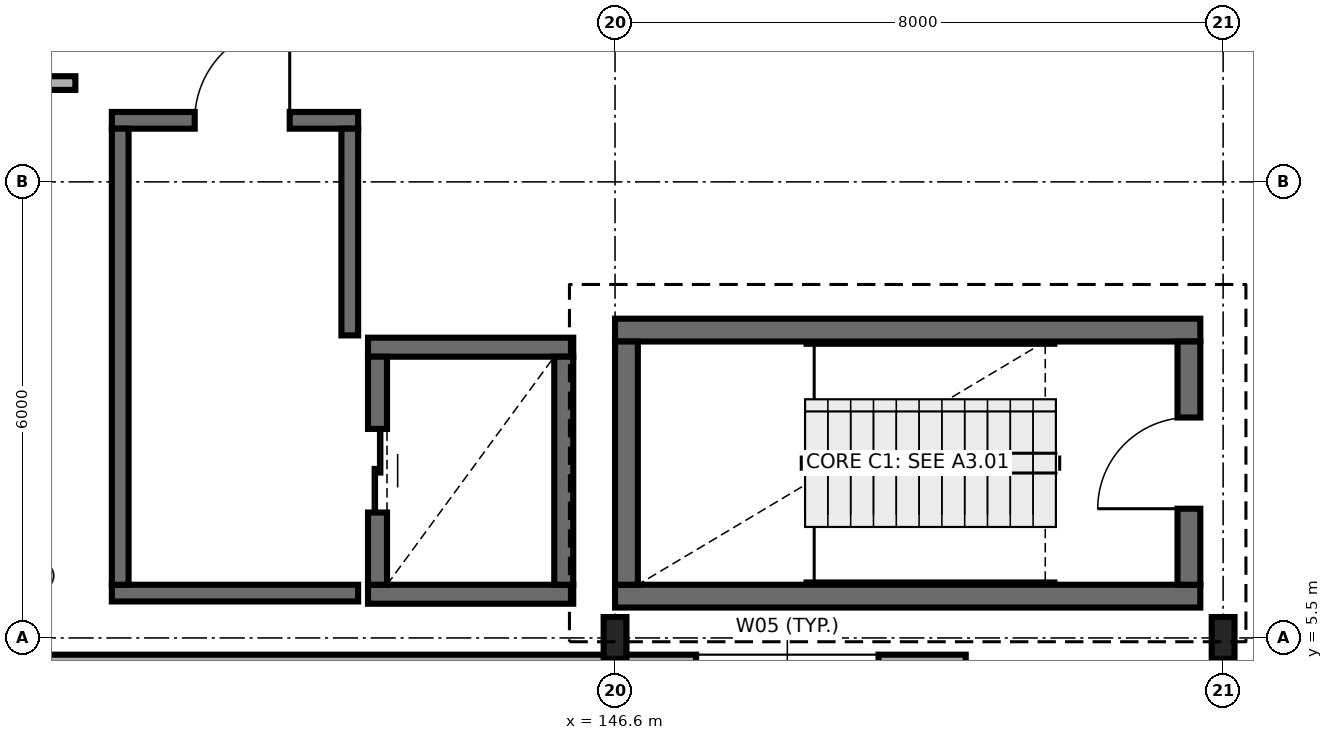
"""IFC4 building model, lengths in metres.
Left out: names, types, materials, properties, quantities, classifications, styles, units other than length and angle.
Written with IfcOpenShell. Run it as: python <this file> out.ifc"""

import sys

from ifc_helpers import new_model, si_unit, direction, frame, frame_2d, origin, origin_2d, place, context, subcontext, project, spatial, rectangle, i_section, extrude, element, fill, save


model = new_model("IFC4")
c1 = context("Model", 3, precision=1e-05, world=origin(), true_north=direction((0.0, 1.0)))
c2 = subcontext(c1, "Body", "Model", "MODEL_VIEW")
j1 = project(units=[si_unit("LENGTHUNIT", "METRE"), si_unit("PLANEANGLEUNIT", "RADIAN")], contexts=[c1])
p1 = place(None, origin())
s1 = spatial("IfcSite", under=j1, at=p1, CompositionType="ELEMENT")
p2 = place(p1, origin())
s2 = spatial("IfcBuilding", under=s1, at=p2, CompositionType="ELEMENT")
p3 = place(p2, frame((0.0, 0.0, 13.8)))
s3 = spatial("IfcBuildingStorey", under=s2, at=p3, CompositionType="ELEMENT", Elevation=13.8)
for number, where, z_axis, x_axis in (
    (1, (146.6, 5.5, 0.0), (0.0, 0.0, 1.0), (1.0, 0.0, 0.0)),
    (2, (154.6, 5.5, 0.0), (0.0, 0.0, 1.0), (1.0, 0.0, 0.0)),
):
    element("IfcColumn", number, at=place(p3, frame(where, z_axis=z_axis, x_axis=x_axis)), inside=s3, PredefinedType="COLUMN", context=c2, shape_type="SweptSolid", body=[
        extrude(i_section(OverallWidth=0.3, OverallDepth=0.55, WebThickness=0.015, FlangeThickness=0.029, FilletRadius=0.027, at=origin_2d()), origin(), (0.0, 0.0, 1.0), 4.5),
    ])
for number, where, z_axis, x_axis in (
    (3, (146.6, 6.05, 0.0), (0.0, 0.0, 1.0), (1.0, 0.0, 0.0)),
    (4, (154.3, 9.55, 0.0), (0.0, 0.0, 1.0), (-1.0, 0.0, 0.0)),
):
    element("IfcWall", number, at=place(p3, frame(where, z_axis=z_axis, x_axis=x_axis)), inside=s3, PredefinedType="SHEAR", context=c2, shape_type="SweptSolid", body=[
        extrude(rectangle(XDim=7.7, YDim=0.3, at=frame_2d((3.85, 0.0))), origin(), (0.0, 0.0, 1.0), 4.5),
    ])
p4 = place(p3, frame((146.75, 9.4, 0.0), z_axis=(0.0, 0.0, 1.0), x_axis=(0.0, -1.0, 0.0)))
e5 = element("IfcWall", 5, at=p4, inside=s3, PredefinedType="SHEAR", context=c2, shape_type="SweptSolid", body=[
    extrude(rectangle(XDim=3.2, YDim=0.3, at=frame_2d((1.6, 0.0))), origin(), (0.0, 0.0, 1.0), 4.5),
])
p5 = place(p3, frame((154.15, 6.2, 0.0), z_axis=(0.0, 0.0, 1.0), x_axis=(0.0, 1.0, 0.0)))
e6 = element("IfcWall", 6, at=p5, inside=s3, PredefinedType="SHEAR", context=c2, shape_type="SweptSolid", body=[
    extrude(rectangle(XDim=3.2, YDim=0.3, at=frame_2d((1.6, 0.0))), origin(), (0.0, 0.0, 1.0), 4.5),
])
p6 = place(p5, frame((1.0, 0.0, 0.0)))
e7 = element("IfcOpeningElement", 7, at=p6, cuts=e6, PredefinedType="OPENING", context=c2, shape_type="SweptSolid", body=[
    extrude(rectangle(XDim=1.2, YDim=2.15, at=frame_2d((0.6, 1.075))), frame((0.0, 0.16, 0.0), z_axis=(0.0, -1.0, 0.0), x_axis=(1.0, 0.0, 0.0)), (0.0, 0.0, 1.0), 0.32),
])
for number, where, z_axis, x_axis in (
    (8, (143.35, 6.075, 0.0), (0.0, 0.0, 1.0), (1.0, 0.0, 0.0)),
    (9, (146.05, 9.325, 0.0), (0.0, 0.0, 1.0), (-1.0, 0.0, 0.0)),
):
    element("IfcWall", number, at=place(p3, frame(where, z_axis=z_axis, x_axis=x_axis)), inside=s3, PredefinedType="SHEAR", context=c2, shape_type="SweptSolid", body=[
        extrude(rectangle(XDim=2.7, YDim=0.25, at=frame_2d((1.35, 0.0))), origin(), (0.0, 0.0, 1.0), 4.5),
    ])
p7 = place(p3, frame((143.475, 9.2, 0.0), z_axis=(0.0, 0.0, 1.0), x_axis=(0.0, -1.0, 0.0)))
e10 = element("IfcWall", 10, at=p7, inside=s3, PredefinedType="SHEAR", context=c2, shape_type="SweptSolid", body=[
    extrude(rectangle(XDim=3.0, YDim=0.25, at=frame_2d((1.5, 0.0))), origin(), (0.0, 0.0, 1.0), 4.5),
])
p8 = place(p7, frame((0.95, 0.0, 0.0)))
e11 = element("IfcOpeningElement", 11, at=p8, cuts=e10, PredefinedType="OPENING", context=c2, shape_type="SweptSolid", body=[
    extrude(rectangle(XDim=1.1, YDim=2.15, at=frame_2d((0.55, 1.075))), frame((0.0, 0.135, 0.0), z_axis=(0.0, -1.0, 0.0), x_axis=(1.0, 0.0, 0.0)), (0.0, 0.0, 1.0), 0.27),
])
p9 = place(p3, frame((145.925, 6.2, 0.0), z_axis=(0.0, 0.0, 1.0), x_axis=(0.0, 1.0, 0.0)))
e12 = element("IfcWall", 12, at=p9, inside=s3, PredefinedType="SHEAR", context=c2, shape_type="SweptSolid", body=[
    extrude(rectangle(XDim=3.0, YDim=0.25, at=frame_2d((1.5, 0.0))), origin(), (0.0, 0.0, 1.0), 4.5),
])
p10 = place(p3, frame((139.98, 6.09, 0.0), z_axis=(0.0, 0.0, 1.0), x_axis=(1.0, 0.0, 0.0)))
e13 = element("IfcWall", 13, at=p10, inside=s3, PredefinedType="SOLIDWALL", context=c2, shape_type="SweptSolid", body=[
    extrude(rectangle(XDim=3.24, YDim=0.22, at=frame_2d((1.62, 0.0))), origin(), (0.0, 0.0, 1.0), 4.25),
])
p11 = place(p3, frame((143.22, 12.31, 0.0), z_axis=(0.0, 0.0, 1.0), x_axis=(-1.0, 0.0, 0.0)))
e14 = element("IfcWall", 14, at=p11, inside=s3, PredefinedType="SOLIDWALL", context=c2, shape_type="SweptSolid", body=[
    extrude(rectangle(XDim=3.24, YDim=0.22, at=frame_2d((1.62, 0.0))), origin(), (0.0, 0.0, 1.0), 4.25),
])
p12 = place(p11, frame((0.9, 0.0, 0.0)))
e15 = element("IfcOpeningElement", 15, at=p12, cuts=e14, PredefinedType="OPENING", context=c2, shape_type="SweptSolid", body=[
    extrude(rectangle(XDim=1.25, YDim=2.15, at=frame_2d((0.625, 1.075))), frame((0.0, 0.12, 0.0), z_axis=(0.0, -1.0, 0.0), x_axis=(1.0, 0.0, 0.0)), (0.0, 0.0, 1.0), 0.24),
])
p13 = place(p3, frame((140.09, 12.2, 0.0), z_axis=(0.0, 0.0, 1.0), x_axis=(0.0, -1.0, 0.0)))
e16 = element("IfcWall", 16, at=p13, inside=s3, PredefinedType="SOLIDWALL", context=c2, shape_type="SweptSolid", body=[
    extrude(rectangle(XDim=6.0, YDim=0.22, at=frame_2d((3.0, 0.0))), origin(), (0.0, 0.0, 1.0), 4.25),
])
p14 = place(p3, frame((143.11, 9.48, 0.0), z_axis=(0.0, 0.0, 1.0), x_axis=(0.0, 1.0, 0.0)))
e17 = element("IfcWall", 17, at=p14, inside=s3, PredefinedType="SOLIDWALL", context=c2, shape_type="SweptSolid", body=[
    extrude(rectangle(XDim=2.72, YDim=0.22, at=frame_2d((1.36, 0.0))), origin(), (0.0, 0.0, 1.0), 4.25),
])
p15 = place(p3, frame((138.028, 5.09, 0.0), z_axis=(0.0, 0.0, 1.0), x_axis=(1.0, 0.0, 0.0)))
e18 = element("IfcWall", 18, at=p15, inside=s3, PredefinedType="SOLIDWALL", context=c2, shape_type="SweptSolid", body=[
    extrude(rectangle(XDim=13.186, YDim=0.38, at=frame_2d((6.593, 0.0))), origin(), (0.0, 0.0, 1.0), 4.24),
])
p16 = place(p15, frame((9.639, 0.0, 0.9)))
e19 = element("IfcOpeningElement", 19, at=p16, cuts=e18, PredefinedType="OPENING", context=c2, shape_type="SweptSolid", body=[
    extrude(rectangle(XDim=2.4, YDim=1.8, at=frame_2d((1.2, 0.9))), frame((0.0, 0.2, 0.0), z_axis=(0.0, -1.0, 0.0), x_axis=(1.0, 0.0, 0.0)), (0.0, 0.0, 1.0), 0.4),
])
p17 = place(p3, frame((105.005, 12.8, 0.0), z_axis=(0.0, 0.0, 1.0), x_axis=(1.0, 0.0, 0.0)))
e20 = element("IfcWall", 20, at=p17, inside=s3, PredefinedType="PARTITIONING", context=c2, shape_type="SweptSolid", body=[
    extrude(rectangle(XDim=34.495, YDim=0.18, at=frame_2d((17.248, 0.0))), origin(), (0.0, 0.0, 1.0), 4.25),
])
p18 = place(p17, frame((6.011, 0.0, 0.0)))
e21 = element("IfcOpeningElement", 21, at=p18, cuts=e20, PredefinedType="OPENING", context=c2, shape_type="SweptSolid", body=[
    extrude(rectangle(XDim=1.1, YDim=2.15, at=frame_2d((0.55, 1.075))), frame((0.0, 0.1, 0.0), z_axis=(0.0, -1.0, 0.0), x_axis=(1.0, 0.0, 0.0)), (0.0, 0.0, 1.0), 0.2),
])
p19 = place(p17, frame((11.548, 0.0, 0.0)))
e22 = element("IfcOpeningElement", 22, at=p19, cuts=e20, PredefinedType="OPENING", context=c2, shape_type="SweptSolid", body=[
    extrude(rectangle(XDim=1.5, YDim=2.2, at=frame_2d((0.75, 1.1))), frame((0.0, 0.1, 0.0), z_axis=(0.0, -1.0, 0.0), x_axis=(1.0, 0.0, 0.0)), (0.0, 0.0, 1.0), 0.2),
])
p20 = place(p17, frame((27.548, 0.0, 0.0)))
e23 = element("IfcOpeningElement", 23, at=p20, cuts=e20, PredefinedType="OPENING", context=c2, shape_type="SweptSolid", body=[
    extrude(rectangle(XDim=0.9, YDim=2.1, at=frame_2d((0.45, 1.05))), frame((0.0, 0.1, 0.0), z_axis=(0.0, -1.0, 0.0), x_axis=(1.0, 0.0, 0.0)), (0.0, 0.0, 1.0), 0.2),
])
p21 = place(p6, origin())
e24 = element("IfcDoor", 24, at=p21, inside=s3, OperationType="SINGLE_SWING_LEFT", PredefinedType="DOOR", context=c2, shape_type="SweptSolid", body=[
    extrude(rectangle(XDim=1.2, YDim=2.15, at=frame_2d((0.6, 1.075))), frame((0.0, 0.025, 0.0), z_axis=(0.0, -1.0, 0.0), x_axis=(1.0, 0.0, 0.0)), (0.0, 0.0, 1.0), 0.05),
])
fill(e7, e24)
p22 = place(p8, origin())
e25 = element("IfcDoor", 25, at=p22, inside=s3, OperationType="DOUBLE_DOOR_SLIDING", PredefinedType="DOOR", context=c2, shape_type="SweptSolid", body=[
    extrude(rectangle(XDim=1.1, YDim=2.15, at=frame_2d((0.55, 1.075))), frame((0.0, 0.025, 0.0), z_axis=(0.0, -1.0, 0.0), x_axis=(1.0, 0.0, 0.0)), (0.0, 0.0, 1.0), 0.05),
])
fill(e11, e25)
p23 = place(p12, frame((1.25, 0.0, 0.0), z_axis=(0.0, 0.0, 1.0), x_axis=(-1.0, 0.0, 0.0)))
e26 = element("IfcDoor", 26, at=p23, inside=s3, OperationType="SINGLE_SWING_LEFT", PredefinedType="DOOR", context=c2, shape_type="SweptSolid", body=[
    extrude(rectangle(XDim=1.25, YDim=2.15, at=frame_2d((0.625, 1.075))), frame((0.0, 0.025, 0.0), z_axis=(0.0, -1.0, 0.0), x_axis=(1.0, 0.0, 0.0)), (0.0, 0.0, 1.0), 0.05),
])
fill(e15, e26)
save(model, sys.argv[1])
